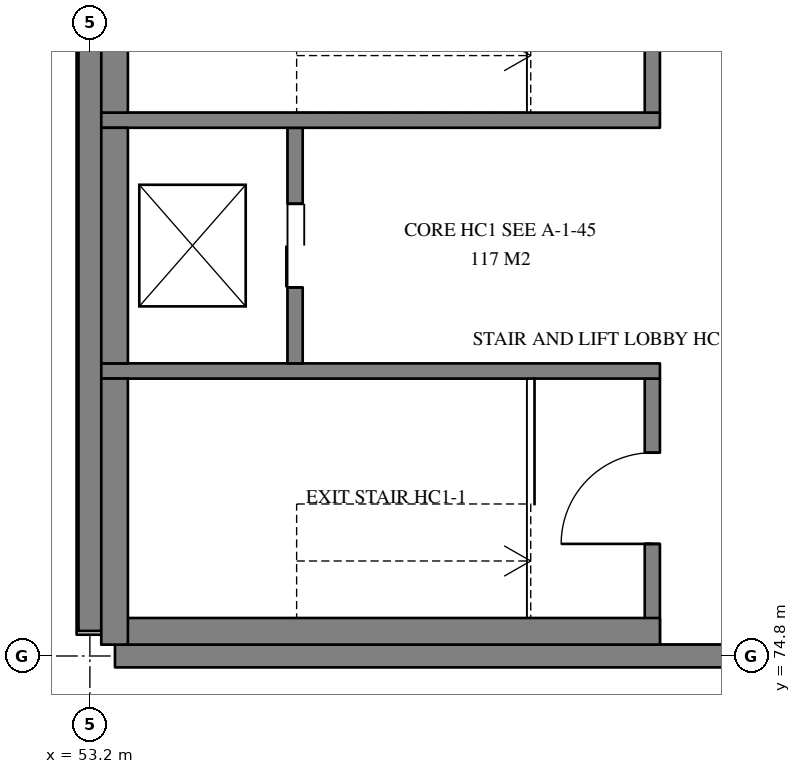
"""IFC4 building model, lengths in metres.
Left out: names, types, materials, properties, quantities, classifications, styles, units other than length and angle.
Written with IfcOpenShell. Run it as: python <this file> out.ifc"""

import sys

from ifc_helpers import new_model, si_unit, direction, frame, frame_2d, origin, origin_2d, place, context, subcontext, project, spatial, rectangle, hollow_circle, extrude, element, fill, save


model = new_model("IFC4")
c1 = context("Model", 3, precision=1e-05, world=origin(), true_north=direction((0.0, 1.0)))
c2 = subcontext(c1, "Body", "Model", "MODEL_VIEW")
j1 = project(units=[si_unit("LENGTHUNIT", "METRE"), si_unit("PLANEANGLEUNIT", "RADIAN")], contexts=[c1])
p1 = place(None, origin())
s1 = spatial("IfcSite", under=j1, at=p1, CompositionType="ELEMENT")
p2 = place(p1, origin())
s2 = spatial("IfcBuilding", under=s1, at=p2, CompositionType="ELEMENT")
p3 = place(p2, frame((0.0, 0.0, 8.7)))
s3 = spatial("IfcBuildingStorey", under=s2, at=p3, CompositionType="ELEMENT", Elevation=8.7)
p4 = place(p3, frame((53.2, 74.8, 0.0), z_axis=(0.0, 0.0, 1.0), x_axis=(1.0, 0.0, 0.0)))
e1 = element("IfcColumn", 1, at=p4, inside=s3, PredefinedType="COLUMN", context=c2, shape_type="SweptSolid", body=[
    extrude(hollow_circle(Radius=0.33, WallThickness=0.025, at=origin_2d()), origin(), (0.0, 0.0, 1.0), 2.616),
])
p5 = place(p3, frame((53.53, 74.8, 0.0), z_axis=(0.0, 0.0, 1.0), x_axis=(1.0, 0.0, 0.0)))
e2 = element("IfcWall", 2, at=p5, inside=s3, PredefinedType="SOLIDWALL", context=c2, shape_type="SweptSolid", body=[
    extrude(rectangle(XDim=10.165, YDim=0.3, at=frame_2d((5.083, 0.0))), origin(), (0.0, 0.0, 1.0), 3.9),
])
p6 = place(p3, frame((53.2, 85.27, 0.0), z_axis=(0.0, 0.0, 1.0), x_axis=(0.0, -1.0, 0.0)))
e3 = element("IfcWall", 3, at=p6, inside=s3, PredefinedType="SOLIDWALL", context=c2, shape_type="SweptSolid", body=[
    extrude(rectangle(XDim=10.14, YDim=0.3, at=frame_2d((5.07, 0.0))), origin(), (0.0, 0.0, 1.0), 3.9),
])
p7 = place(p3, frame((53.2, 75.08, 3.9), z_axis=(0.0, 0.0, 1.0), x_axis=(0.0, 1.0, 0.0)))
e4 = element("IfcWall", 4, at=p7, inside=s3, PredefinedType="SOLIDWALL", context=c2, shape_type="SweptSolid", body=[
    extrude(rectangle(XDim=10.24, YDim=0.35, at=frame_2d((5.12, 0.0))), origin(), (0.0, 0.0, 1.0), 3.821),
])
p8 = place(p3, frame((60.6, 74.95, 0.0), z_axis=(0.0, 0.0, 1.0), x_axis=(0.0, 1.0, 0.0)))
e5 = element("IfcWall", 5, at=p8, inside=s3, PredefinedType="SOLIDWALL", context=c2, shape_type="SweptSolid", body=[
    extrude(rectangle(XDim=3.5, YDim=0.2, at=frame_2d((1.75, 0.0))), origin(), (0.0, 0.0, 1.0), 3.6),
])
p9 = place(p8, frame((1.325, 0.0, 0.0)))
e6 = element("IfcOpeningElement", 6, at=p9, cuts=e5, PredefinedType="OPENING", context=c2, shape_type="SweptSolid", body=[
    extrude(rectangle(XDim=1.2, YDim=2.1, at=frame_2d((0.6, 1.05))), frame((0.0, 0.11, 0.0), z_axis=(0.0, -1.0, 0.0), x_axis=(1.0, 0.0, 0.0)), (0.0, 0.0, 1.0), 0.22),
])
p10 = place(p3, frame((60.7, 78.55, 0.0), z_axis=(0.0, 0.0, 1.0), x_axis=(-1.0, 0.0, 0.0)))
e7 = element("IfcWall", 7, at=p10, inside=s3, PredefinedType="SOLIDWALL", context=c2, shape_type="SweptSolid", body=[
    extrude(rectangle(XDim=7.35, YDim=0.2, at=frame_2d((3.675, 0.0))), origin(), (0.0, 0.0, 1.0), 3.6),
])
p11 = place(p3, frame((55.9, 78.65, 0.0), z_axis=(0.0, 0.0, 1.0), x_axis=(0.0, 1.0, 0.0)))
e8 = element("IfcWall", 8, at=p11, inside=s3, PredefinedType="SOLIDWALL", context=c2, shape_type="SweptSolid", body=[
    extrude(rectangle(XDim=3.1, YDim=0.2, at=frame_2d((1.55, 0.0))), origin(), (0.0, 0.0, 1.0), 3.6),
])
p12 = place(p11, frame((1.0, 0.0, 0.0)))
e9 = element("IfcOpeningElement", 9, at=p12, cuts=e8, PredefinedType="OPENING", context=c2, shape_type="SweptSolid", body=[
    extrude(rectangle(XDim=1.1, YDim=2.1, at=frame_2d((0.55, 1.05))), frame((0.0, 0.11, 0.0), z_axis=(0.0, -1.0, 0.0), x_axis=(1.0, 0.0, 0.0)), (0.0, 0.0, 1.0), 0.22),
])
p13 = place(p3, frame((60.7, 81.85, 0.0), z_axis=(0.0, 0.0, 1.0), x_axis=(-1.0, 0.0, 0.0)))
e10 = element("IfcWall", 10, at=p13, inside=s3, PredefinedType="SOLIDWALL", context=c2, shape_type="SweptSolid", body=[
    extrude(rectangle(XDim=7.35, YDim=0.2, at=frame_2d((3.675, 0.0))), origin(), (0.0, 0.0, 1.0), 3.6),
])
p14 = place(p3, frame((60.6, 81.95, 0.0), z_axis=(0.0, 0.0, 1.0), x_axis=(0.0, 1.0, 0.0)))
e11 = element("IfcWall", 11, at=p14, inside=s3, PredefinedType="SOLIDWALL", context=c2, shape_type="SweptSolid", body=[
    extrude(rectangle(XDim=3.5, YDim=0.2, at=frame_2d((1.75, 0.0))), origin(), (0.0, 0.0, 1.0), 3.6),
])
p15 = place(p14, frame((0.975, 0.0, 0.0)))
e12 = element("IfcOpeningElement", 12, at=p15, cuts=e11, PredefinedType="OPENING", context=c2, shape_type="SweptSolid", body=[
    extrude(rectangle(XDim=1.2, YDim=2.1, at=frame_2d((0.6, 1.05))), frame((0.0, 0.11, 0.0), z_axis=(0.0, -1.0, 0.0), x_axis=(1.0, 0.0, 0.0)), (0.0, 0.0, 1.0), 0.22),
])
p16 = place(p3, frame((60.7, 75.125, -0.3), z_axis=(0.0, 0.0, 1.0), x_axis=(-1.0, 0.0, 0.0)))
e13 = element("IfcWall", 13, at=p16, inside=s3, PredefinedType="SOLIDWALL", context=c2, shape_type="SweptSolid", body=[
    extrude(rectangle(XDim=7.35, YDim=0.35, at=frame_2d((3.675, 0.0))), origin(), (0.0, 0.0, 1.0), 3.9),
])
for number, where, z_axis, x_axis in (
    (14, (53.525, 74.95, -0.3), (0.0, 0.0, 1.0), (0.0, 1.0, 0.0)),
    (15, (53.525, 81.95, -0.3), (0.0, 0.0, 1.0), (0.0, 1.0, 0.0)),
):
    element("IfcWall", number, at=place(p3, frame(where, z_axis=z_axis, x_axis=x_axis)), inside=s3, PredefinedType="SOLIDWALL", context=c2, shape_type="SweptSolid", body=[
        extrude(rectangle(XDim=3.5, YDim=0.35, at=frame_2d((1.75, 0.0))), origin(), (0.0, 0.0, 1.0), 3.9),
    ])
p17 = place(p3, frame((53.525, 78.65, -0.3), z_axis=(0.0, 0.0, 1.0), x_axis=(0.0, 1.0, 0.0)))
e16 = element("IfcWall", 16, at=p17, inside=s3, PredefinedType="SOLIDWALL", context=c2, shape_type="SweptSolid", body=[
    extrude(rectangle(XDim=3.1, YDim=0.35, at=frame_2d((1.55, 0.0))), origin(), (0.0, 0.0, 1.0), 3.9),
])
p18 = place(p2, frame((0.0, 0.0, 4.8)))
s4 = spatial("IfcBuildingStorey", under=s2, at=p18, CompositionType="ELEMENT", Elevation=4.8)
p19 = place(p18, frame((60.325, 64.0, 0.0), z_axis=(0.0, 0.0, 1.0), x_axis=(0.0, 1.0, 0.0)))
e17 = element("IfcWall", 17, at=p19, inside=s4, PredefinedType="PARTITIONING", context=c2, shape_type="SweptSolid", body=[
    extrude(rectangle(XDim=10.62, YDim=0.15, at=frame_2d((5.31, 0.0))), origin(), (0.0, 0.0, 1.0), 7.574),
])
p20 = place(p19, frame((4.81, 0.0, 0.0)))
e18 = element("IfcOpeningElement", 18, at=p20, cuts=e17, PredefinedType="OPENING", context=c2, shape_type="SweptSolid", body=[
    extrude(rectangle(XDim=1.0, YDim=2.1, at=frame_2d((0.5, 1.05))), frame((0.0, 0.085, 0.0), z_axis=(0.0, -1.0, 0.0), x_axis=(1.0, 0.0, 0.0)), (0.0, 0.0, 1.0), 0.17),
])
p21 = place(p12, frame((1.1, 0.0, 0.0), z_axis=(0.0, 0.0, 1.0), x_axis=(-1.0, 0.0, 0.0)))
e19 = element("IfcDoor", 19, at=p21, inside=s3, OperationType="DOUBLE_DOOR_SLIDING", PredefinedType="DOOR", context=c2, shape_type="SweptSolid", body=[
    extrude(rectangle(XDim=1.1, YDim=2.1, at=frame_2d((0.55, 1.05))), frame((0.0, 0.025, 0.0), z_axis=(0.0, -1.0, 0.0), x_axis=(1.0, 0.0, 0.0)), (0.0, 0.0, 1.0), 0.05),
])
fill(e9, e19)
p22 = place(p9, frame((1.2, 0.0, 0.0), z_axis=(0.0, 0.0, 1.0), x_axis=(-1.0, 0.0, 0.0)))
e20 = element("IfcDoor", 20, at=p22, inside=s3, OperationType="SINGLE_SWING_LEFT", PredefinedType="DOOR", context=c2, shape_type="SweptSolid", body=[
    extrude(rectangle(XDim=1.2, YDim=2.1, at=frame_2d((0.6, 1.05))), frame((0.0, 0.025, 0.0), z_axis=(0.0, -1.0, 0.0), x_axis=(1.0, 0.0, 0.0)), (0.0, 0.0, 1.0), 0.05),
])
fill(e6, e20)
save(model, sys.argv[1])
